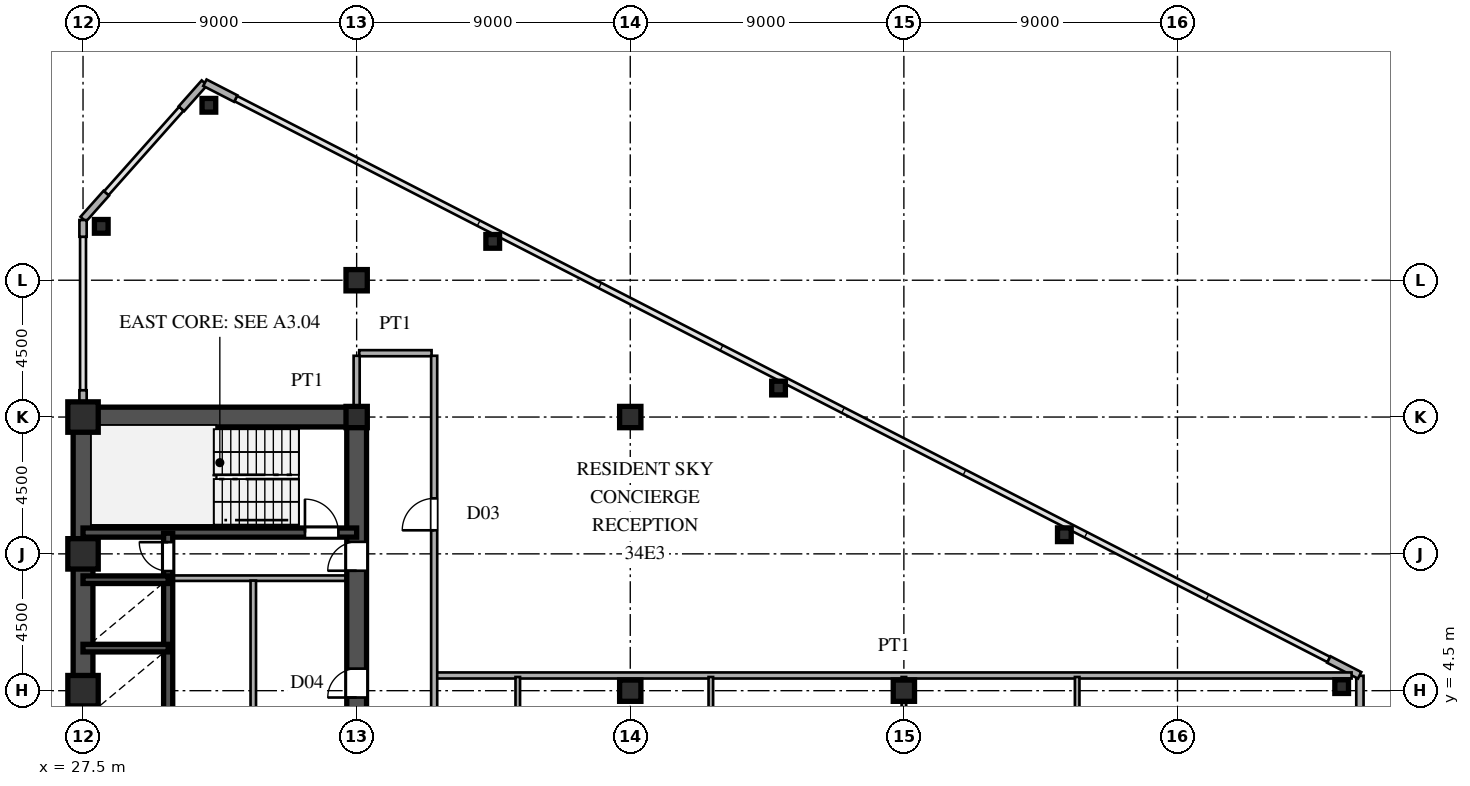
"""IFC4 building model, lengths in metres.
Left out: names, types, materials, properties, quantities, classifications, styles, units other than length and angle.
Written with IfcOpenShell. Run it as: python <this file> out.ifc"""

import sys

from ifc_helpers import new_model, si_unit, direction, frame, frame_2d, origin, origin_2d, place, context, subcontext, project, spatial, rectangle, hollow_rectangle, i_section, extrude, source, transform, mapped, element, fill, save


model = new_model("IFC4")
c1 = context("Model", 3, precision=1e-05, world=origin(), true_north=direction((0.0, 1.0)))
c2 = subcontext(c1, "Body", "Model", "MODEL_VIEW")
j1 = project(units=[si_unit("LENGTHUNIT", "METRE"), si_unit("PLANEANGLEUNIT", "RADIAN")], contexts=[c1])
p1 = place(None, origin())
s1 = spatial("IfcSite", under=j1, at=p1, CompositionType="ELEMENT")
p2 = place(p1, origin())
s2 = spatial("IfcBuilding", under=s1, at=p2, CompositionType="ELEMENT")
p3 = place(p2, frame((0.0, 0.0, 128.4)))
s3 = spatial("IfcBuildingStorey", under=s2, at=p3, CompositionType="ELEMENT", Elevation=128.4)
m1 = source(origin(), c2, "Body", "SweptSolid", [
    extrude(hollow_rectangle(XDim=1.0, YDim=1.0, WallThickness=0.042, at=origin_2d()), origin(), (0.0, 0.0, 1.0), 3.6),
])
for number, where, z_axis, x_axis in (
    (1, (27.5, 4.5, 0.0), (0.0, 0.0, 1.0), (1.0, 0.0, 0.0)),
    (2, (27.5, 9.0, 0.0), (0.0, 0.0, 1.0), (1.0, 0.0, 0.0)),
    (3, (27.5, 13.5, 0.0), (0.0, 0.0, 1.0), (1.0, 0.0, 0.0)),
):
    element("IfcColumn", number, at=place(p3, frame(where, z_axis=z_axis, x_axis=x_axis)), inside=s3, PredefinedType="COLUMN", context=c2, shape_type="MappedRepresentation", body=[
        mapped(m1, transform((0.0, 0.0, 0.0), scale=1.0)),
    ])
m2 = source(origin(), c2, "Body", "SweptSolid", [
    extrude(i_section(OverallWidth=0.7, OverallDepth=0.7, WebThickness=0.028, FlangeThickness=0.045, at=origin_2d()), origin(), (0.0, 0.0, 1.0), 3.6),
])
for number, where, z_axis, x_axis in (
    (4, (36.5, 13.5, 0.0), (0.0, 0.0, 1.0), (1.0, 0.0, 0.0)),
    (5, (36.5, 18.0, 0.0), (0.0, 0.0, 1.0), (1.0, 0.0, 0.0)),
    (6, (45.5, 4.5, 0.0), (0.0, 0.0, 1.0), (1.0, 0.0, 0.0)),
    (7, (45.5, 13.5, 0.0), (0.0, 0.0, 1.0), (1.0, 0.0, 0.0)),
    (8, (54.5, 4.5, 0.0), (0.0, 0.0, 1.0), (1.0, 0.0, 0.0)),
):
    element("IfcColumn", number, at=place(p3, frame(where, z_axis=z_axis, x_axis=x_axis)), inside=s3, PredefinedType="COLUMN", context=c2, shape_type="MappedRepresentation", body=[
        mapped(m2, transform((0.0, 0.0, 0.0), scale=1.0)),
    ])
m3 = source(origin(), c2, "Body", "SweptSolid", [
    extrude(hollow_rectangle(XDim=0.45, YDim=0.45, WallThickness=0.018, at=origin_2d()), origin(), (0.0, 0.0, 1.0), 3.6),
])
for number, where, z_axis, x_axis in (
    (9, (68.9, 4.634, 0.0), (0.0, 0.0, 1.0), (1.0, 0.0, 0.0)),
    (10, (31.64, 23.754, 0.0), (0.0, 0.0, 1.0), (1.0, 0.0, 0.0)),
    (11, (28.1, 19.772, 0.0), (0.0, 0.0, 1.0), (1.0, 0.0, 0.0)),
    (12, (40.976, 19.278, 0.0), (0.0, 0.0, 1.0), (1.0, 0.0, 0.0)),
    (13, (50.377, 14.453, 0.0), (0.0, 0.0, 1.0), (1.0, 0.0, 0.0)),
    (14, (59.779, 9.629, 0.0), (0.0, 0.0, 1.0), (1.0, 0.0, 0.0)),
):
    element("IfcColumn", number, at=place(p3, frame(where, z_axis=z_axis, x_axis=x_axis)), inside=s3, PredefinedType="COLUMN", context=c2, shape_type="MappedRepresentation", body=[
        mapped(m3, transform((0.0, 0.0, 0.0), scale=1.0)),
    ])
p4 = place(p3, frame((69.5, 3.85, 0.0), z_axis=(0.0, 0.0, 1.0), x_axis=(0.0, 1.0, 0.0)))
e15 = element("IfcWall", 15, at=p4, inside=s3, PredefinedType="SOLIDWALL", context=c2, shape_type="SweptSolid", body=[
    extrude(rectangle(XDim=1.14, YDim=0.24, at=frame_2d((0.57, 0.0))), origin(), (0.0, 0.0, 1.0), 3.38),
])
for number, where, z_axis, x_axis in (
    (16, (69.491, 5.005, 0.0), (0.0, 0.0, 1.0), (-0.89, 0.456, 0.0)),
    (17, (32.523, 23.975, 0.0), (0.0, 0.0, 1.0), (-0.89, 0.456, 0.0)),
):
    element("IfcWall", number, at=place(p3, frame(where, z_axis=z_axis, x_axis=x_axis)), inside=s3, PredefinedType="SOLIDWALL", context=c2, shape_type="SweptSolid", body=[
        extrude(rectangle(XDim=1.14, YDim=0.24, at=frame_2d((0.57, 0.0))), origin(), (0.0, 0.0, 1.0), 3.38),
    ])
for number, where, z_axis, x_axis in (
    (18, (31.493, 24.492, 0.0), (0.0, 0.0, 1.0), (-0.664, -0.747, 0.0)),
    (19, (28.264, 20.86, 0.0), (0.0, 0.0, 1.0), (-0.664, -0.747, 0.0)),
):
    element("IfcWall", number, at=place(p3, frame(where, z_axis=z_axis, x_axis=x_axis)), inside=s3, PredefinedType="SOLIDWALL", context=c2, shape_type="SweptSolid", body=[
        extrude(rectangle(XDim=1.14, YDim=0.24, at=frame_2d((0.57, 0.0))), origin(), (0.0, 0.0, 1.0), 3.38),
    ])
p5 = place(p3, frame((27.5, 13.83, 0.0), z_axis=(0.0, 0.0, 1.0), x_axis=(0.0, 1.0, 0.0)))
e20 = element("IfcWall", 20, at=p5, inside=s3, PredefinedType="SOLIDWALL", context=c2, shape_type="SweptSolid", body=[
    extrude(rectangle(XDim=0.55, YDim=0.24, at=frame_2d((0.275, 0.0))), origin(), (0.0, 0.0, 1.0), 2.88),
])
p6 = place(p3, frame((27.5, 19.43, 0.0), z_axis=(0.0, 0.0, 1.0), x_axis=(0.0, 1.0, 0.0)))
e21 = element("IfcWall", 21, at=p6, inside=s3, PredefinedType="SOLIDWALL", context=c2, shape_type="SweptSolid", body=[
    extrude(rectangle(XDim=0.55, YDim=0.24, at=frame_2d((0.275, 0.0))), origin(), (0.0, 0.0, 1.0), 3.38),
])
p7 = place(p3, frame((27.5, 1.3, 0.0), z_axis=(0.0, 0.0, 1.0), x_axis=(0.0, 1.0, 0.0)))
e22 = element("IfcWall", 22, at=p7, inside=s3, PredefinedType="SHEAR", context=c2, shape_type="SweptSolid", body=[
    extrude(rectangle(XDim=12.2, YDim=0.65, at=frame_2d((6.1, 0.0))), origin(), (0.0, 0.0, 1.0), 3.38),
])
p8 = place(p3, frame((27.5, 13.5, 0.0), z_axis=(0.0, 0.0, 1.0), x_axis=(1.0, 0.0, 0.0)))
e23 = element("IfcWall", 23, at=p8, inside=s3, PredefinedType="SHEAR", context=c2, shape_type="SweptSolid", body=[
    extrude(rectangle(XDim=9.0, YDim=0.65, at=frame_2d((4.5, 0.0))), origin(), (0.0, 0.0, 1.0), 3.38),
])
p9 = place(p3, frame((36.5, 8.2, 0.0), z_axis=(0.0, 0.0, 1.0), x_axis=(0.0, 1.0, 0.0)))
e24 = element("IfcWall", 24, at=p9, inside=s3, PredefinedType="SHEAR", context=c2, shape_type="SweptSolid", body=[
    extrude(rectangle(XDim=5.45, YDim=0.65, at=frame_2d((2.725, 0.0))), origin(), (0.0, 0.0, 1.0), 3.38),
])
p10 = place(p9, frame((0.245, 0.0, 0.0)))
e25 = element("IfcOpeningElement", 25, at=p10, cuts=e24, PredefinedType="OPENING", context=c2, shape_type="SweptSolid", body=[
    extrude(rectangle(XDim=0.95, YDim=2.15, at=frame_2d((0.475, 1.075))), frame((0.0, 0.335, 0.0), z_axis=(0.0, -1.0, 0.0), x_axis=(1.0, 0.0, 0.0)), (0.0, 0.0, 1.0), 0.67),
])
p11 = place(p3, frame((36.5, 1.3, 0.0), z_axis=(0.0, 0.0, 1.0), x_axis=(0.0, 1.0, 0.0)))
e26 = element("IfcWall", 26, at=p11, inside=s3, PredefinedType="SHEAR", context=c2, shape_type="SweptSolid", body=[
    extrude(rectangle(XDim=6.9, YDim=0.65, at=frame_2d((3.45, 0.0))), origin(), (0.0, 0.0, 1.0), 3.38),
])
p12 = place(p11, frame((2.975, 0.0, 0.0)))
e27 = element("IfcOpeningElement", 27, at=p12, cuts=e26, PredefinedType="OPENING", context=c2, shape_type="SweptSolid", body=[
    extrude(rectangle(XDim=0.95, YDim=2.15, at=frame_2d((0.475, 1.075))), frame((0.0, 0.335, 0.0), z_axis=(0.0, -1.0, 0.0), x_axis=(1.0, 0.0, 0.0)), (0.0, 0.0, 1.0), 0.67),
])
p13 = place(p3, frame((27.5, 9.7, 0.0), z_axis=(0.0, 0.0, 1.0), x_axis=(1.0, 0.0, 0.0)))
e28 = element("IfcWall", 28, at=p13, inside=s3, PredefinedType="SHEAR", context=c2, shape_type="SweptSolid", body=[
    extrude(rectangle(XDim=9.0, YDim=0.3, at=frame_2d((4.5, 0.0))), origin(), (0.0, 0.0, 1.0), 3.38),
])
p14 = place(p13, frame((7.3, 0.0, 0.0)))
e29 = element("IfcOpeningElement", 29, at=p14, cuts=e28, PredefinedType="OPENING", context=c2, shape_type="SweptSolid", body=[
    extrude(rectangle(XDim=1.1, YDim=2.2, at=frame_2d((0.55, 1.1))), frame((0.0, 0.16, 0.0), z_axis=(0.0, -1.0, 0.0), x_axis=(1.0, 0.0, 0.0)), (0.0, 0.0, 1.0), 0.32),
])
for number, where, z_axis, x_axis in (
    (30, (27.5, 5.9, 0.0), (0.0, 0.0, 1.0), (1.0, 0.0, 0.0)),
    (31, (27.5, 8.15, 0.0), (0.0, 0.0, 1.0), (1.0, 0.0, 0.0)),
):
    element("IfcWall", number, at=place(p3, frame(where, z_axis=z_axis, x_axis=x_axis)), inside=s3, PredefinedType="SHEAR", context=c2, shape_type="SweptSolid", body=[
        extrude(rectangle(XDim=2.8, YDim=0.25, at=frame_2d((1.4, 0.0))), origin(), (0.0, 0.0, 1.0), 3.38),
    ])
p15 = place(p3, frame((30.3, 3.6, 0.0), z_axis=(0.0, 0.0, 1.0), x_axis=(0.0, 1.0, 0.0)))
e32 = element("IfcWall", 32, at=p15, inside=s3, PredefinedType="SHEAR", context=c2, shape_type="SweptSolid", body=[
    extrude(rectangle(XDim=2.3, YDim=0.3, at=frame_2d((1.15, 0.0))), origin(), (0.0, 0.0, 1.0), 3.38),
])
p16 = place(p3, frame((30.3, 5.9, 0.0), z_axis=(0.0, 0.0, 1.0), x_axis=(0.0, 1.0, 0.0)))
e33 = element("IfcWall", 33, at=p16, inside=s3, PredefinedType="SHEAR", context=c2, shape_type="SweptSolid", body=[
    extrude(rectangle(XDim=2.25, YDim=0.3, at=frame_2d((1.125, 0.0))), origin(), (0.0, 0.0, 1.0), 3.38),
])
p17 = place(p3, frame((30.3, 8.15, 0.0), z_axis=(0.0, 0.0, 1.0), x_axis=(0.0, 1.0, 0.0)))
e34 = element("IfcWall", 34, at=p17, inside=s3, PredefinedType="SHEAR", context=c2, shape_type="SweptSolid", body=[
    extrude(rectangle(XDim=1.53, YDim=0.3, at=frame_2d((0.765, 0.0))), origin(), (0.0, 0.0, 1.0), 3.38),
])
p18 = place(p17, frame((0.285, 0.0, 0.0)))
e35 = element("IfcOpeningElement", 35, at=p18, cuts=e34, PredefinedType="OPENING", context=c2, shape_type="SweptSolid", body=[
    extrude(rectangle(XDim=0.95, YDim=2.15, at=frame_2d((0.475, 1.075))), frame((0.0, 0.16, 0.0), z_axis=(0.0, -1.0, 0.0), x_axis=(1.0, 0.0, 0.0)), (0.0, 0.0, 1.0), 0.32),
])
p19 = place(p3, frame((30.45, 8.2, 0.0), z_axis=(0.0, 0.0, 1.0), x_axis=(1.0, 0.0, 0.0)))
e36 = element("IfcWall", 36, at=p19, inside=s3, PredefinedType="PARTITIONING", context=c2, shape_type="SweptSolid", body=[
    extrude(rectangle(XDim=5.7, YDim=0.18, at=frame_2d((2.85, 0.0))), origin(), (0.0, 0.0, 1.0), 3.38),
])
p20 = place(p3, frame((33.1, 1.38, 0.0), z_axis=(0.0, 0.0, 1.0), x_axis=(0.0, 1.0, 0.0)))
e37 = element("IfcWall", 37, at=p20, inside=s3, PredefinedType="PARTITIONING", context=c2, shape_type="SweptSolid", body=[
    extrude(rectangle(XDim=6.74, YDim=0.18, at=frame_2d((3.37, 0.0))), origin(), (0.0, 0.0, 1.0), 3.38),
])
p21 = place(p3, frame((39.13, 5.0, 0.0), z_axis=(0.0, 0.0, 1.0), x_axis=(1.0, 0.0, 0.0)))
e38 = element("IfcWall", 38, at=p21, inside=s3, PredefinedType="PARTITIONING", context=c2, shape_type="SweptSolid", body=[
    extrude(rectangle(XDim=30.096, YDim=0.2, at=frame_2d((15.048, 0.0))), origin(), (0.0, 0.0, 1.0), 3.38),
])
p22 = place(p3, frame((36.585, 15.6, 0.0), z_axis=(0.0, 0.0, 1.0), x_axis=(1.0, 0.0, 0.0)))
e39 = element("IfcWall", 39, at=p22, inside=s3, PredefinedType="PARTITIONING", context=c2, shape_type="SweptSolid", body=[
    extrude(rectangle(XDim=2.38, YDim=0.2, at=frame_2d((1.19, 0.0))), origin(), (0.0, 0.0, 1.0), 3.38),
])
p23 = place(p3, frame((36.5, 13.83, 0.0), z_axis=(0.0, 0.0, 1.0), x_axis=(0.0, 1.0, 0.0)))
e40 = element("IfcWall", 40, at=p23, inside=s3, PredefinedType="PARTITIONING", context=c2, shape_type="SweptSolid", body=[
    extrude(rectangle(XDim=1.685, YDim=0.2, at=frame_2d((0.842, 0.0))), origin(), (0.0, 0.0, 1.0), 2.78),
])
p24 = place(p3, frame((39.05, -15.515, 0.0), z_axis=(0.0, 0.0, 1.0), x_axis=(0.0, 1.0, 0.0)))
e41 = element("IfcWall", 41, at=p24, inside=s3, PredefinedType="PARTITIONING", context=c2, shape_type="SweptSolid", body=[
    extrude(rectangle(XDim=31.03, YDim=0.2, at=frame_2d((15.515, 0.0))), origin(), (0.0, 0.0, 1.0), 3.38),
])
p25 = place(p24, frame((1.845, 0.0, 0.0)))
e42 = element("IfcOpeningElement", 42, at=p25, cuts=e41, PredefinedType="OPENING", context=c2, shape_type="SweptSolid", body=[
    extrude(rectangle(XDim=1.05, YDim=2.25, at=frame_2d((0.525, 1.125))), frame((0.0, 0.11, 0.0), z_axis=(0.0, -1.0, 0.0), x_axis=(1.0, 0.0, 0.0)), (0.0, 0.0, 1.0), 0.22),
])
p26 = place(p24, frame((12.78, 0.0, 0.0)))
e43 = element("IfcOpeningElement", 43, at=p26, cuts=e41, PredefinedType="OPENING", context=c2, shape_type="SweptSolid", body=[
    extrude(rectangle(XDim=1.05, YDim=2.25, at=frame_2d((0.525, 1.125))), frame((0.0, 0.11, 0.0), z_axis=(0.0, -1.0, 0.0), x_axis=(1.0, 0.0, 0.0)), (0.0, 0.0, 1.0), 0.22),
])
p27 = place(p24, frame((25.29, 0.0, 0.0)))
e44 = element("IfcOpeningElement", 44, at=p27, cuts=e41, PredefinedType="OPENING", context=c2, shape_type="SweptSolid", body=[
    extrude(rectangle(XDim=1.05, YDim=2.25, at=frame_2d((0.525, 1.125))), frame((0.0, 0.11, 0.0), z_axis=(0.0, -1.0, 0.0), x_axis=(1.0, 0.0, 0.0)), (0.0, 0.0, 1.0), 0.22),
])
p28 = place(p3, frame((41.8, 0.852, 0.0), z_axis=(0.0, 0.0, 1.0), x_axis=(0.0, 1.0, 0.0)))
e45 = element("IfcWall", 45, at=p28, inside=s3, PredefinedType="PARTITIONING", context=c2, shape_type="SweptSolid", body=[
    extrude(rectangle(XDim=4.098, YDim=0.15, at=frame_2d((2.049, 0.0))), origin(), (0.0, 0.0, 1.0), 3.38),
])
p29 = place(p3, frame((48.15, -8.95, 0.0), z_axis=(0.0, 0.0, 1.0), x_axis=(0.0, 1.0, 0.0)))
e46 = element("IfcWall", 46, at=p29, inside=s3, PredefinedType="PARTITIONING", context=c2, shape_type="SweptSolid", body=[
    extrude(rectangle(XDim=13.9, YDim=0.15, at=frame_2d((6.95, 0.0))), origin(), (0.0, 0.0, 1.0), 3.38),
])
p30 = place(p29, frame((6.475, 0.0, 0.0)))
e47 = element("IfcOpeningElement", 47, at=p30, cuts=e46, PredefinedType="OPENING", context=c2, shape_type="SweptSolid", body=[
    extrude(rectangle(XDim=0.95, YDim=2.15, at=frame_2d((0.475, 1.075))), frame((0.0, 0.085, 0.0), z_axis=(0.0, -1.0, 0.0), x_axis=(1.0, 0.0, 0.0)), (0.0, 0.0, 1.0), 0.17),
])
p31 = place(p29, frame((1.808, 0.0, 0.0)))
e48 = element("IfcOpeningElement", 48, at=p31, cuts=e46, PredefinedType="OPENING", context=c2, shape_type="SweptSolid", body=[
    extrude(rectangle(XDim=0.95, YDim=2.15, at=frame_2d((0.475, 1.075))), frame((0.0, 0.085, 0.0), z_axis=(0.0, -1.0, 0.0), x_axis=(1.0, 0.0, 0.0)), (0.0, 0.0, 1.0), 0.17),
])
p32 = place(p3, frame((54.5, -12.355, 0.0), z_axis=(0.0, 0.0, 1.0), x_axis=(0.0, 1.0, 0.0)))
e49 = element("IfcWall", 49, at=p32, inside=s3, PredefinedType="PARTITIONING", context=c2, shape_type="SweptSolid", body=[
    extrude(rectangle(XDim=17.305, YDim=0.15, at=frame_2d((8.652, 0.0))), origin(), (0.0, 0.0, 1.0), 2.78),
])
p33 = place(p32, frame((1.177, 0.0, 0.0)))
e50 = element("IfcOpeningElement", 50, at=p33, cuts=e49, PredefinedType="OPENING", context=c2, shape_type="SweptSolid", body=[
    extrude(rectangle(XDim=0.95, YDim=2.15, at=frame_2d((0.475, 1.075))), frame((0.0, 0.085, 0.0), z_axis=(0.0, -1.0, 0.0), x_axis=(1.0, 0.0, 0.0)), (0.0, 0.0, 1.0), 0.17),
])
p34 = place(p32, frame((9.88, 0.0, 0.0)))
e51 = element("IfcOpeningElement", 51, at=p34, cuts=e49, PredefinedType="OPENING", context=c2, shape_type="SweptSolid", body=[
    extrude(rectangle(XDim=0.95, YDim=2.15, at=frame_2d((0.475, 1.075))), frame((0.0, 0.085, 0.0), z_axis=(0.0, -1.0, 0.0), x_axis=(1.0, 0.0, 0.0)), (0.0, 0.0, 1.0), 0.17),
])
p35 = place(p32, frame((14.547, 0.0, 0.0)))
e52 = element("IfcOpeningElement", 52, at=p35, cuts=e49, PredefinedType="OPENING", context=c2, shape_type="SweptSolid", body=[
    extrude(rectangle(XDim=0.95, YDim=2.15, at=frame_2d((0.475, 1.075))), frame((0.0, 0.085, 0.0), z_axis=(0.0, -1.0, 0.0), x_axis=(1.0, 0.0, 0.0)), (0.0, 0.0, 1.0), 0.17),
])
p36 = place(p3, frame((60.2, -4.283, 0.0), z_axis=(0.0, 0.0, 1.0), x_axis=(0.0, 1.0, 0.0)))
e53 = element("IfcWall", 53, at=p36, inside=s3, PredefinedType="PARTITIONING", context=c2, shape_type="SweptSolid", body=[
    extrude(rectangle(XDim=9.233, YDim=0.15, at=frame_2d((4.616, 0.0))), origin(), (0.0, 0.0, 1.0), 3.38),
])
p37 = place(p36, frame((1.808, 0.0, 0.0)))
e54 = element("IfcOpeningElement", 54, at=p37, cuts=e53, PredefinedType="OPENING", context=c2, shape_type="SweptSolid", body=[
    extrude(rectangle(XDim=0.95, YDim=2.15, at=frame_2d((0.475, 1.075))), frame((0.0, 0.085, 0.0), z_axis=(0.0, -1.0, 0.0), x_axis=(1.0, 0.0, 0.0)), (0.0, 0.0, 1.0), 0.17),
])
p38 = place(p36, frame((6.475, 0.0, 0.0)))
e55 = element("IfcOpeningElement", 55, at=p38, cuts=e53, PredefinedType="OPENING", context=c2, shape_type="SweptSolid", body=[
    extrude(rectangle(XDim=0.95, YDim=2.15, at=frame_2d((0.475, 1.075))), frame((0.0, 0.085, 0.0), z_axis=(0.0, -1.0, 0.0), x_axis=(1.0, 0.0, 0.0)), (0.0, 0.0, 1.0), 0.17),
])
m4 = source(origin(), c2, "Body", "SweptSolid", [
    extrude(rectangle(XDim=0.95, YDim=2.15, at=frame_2d((0.475, 1.075))), frame((0.0, 0.025, 0.0), z_axis=(0.0, -1.0, 0.0), x_axis=(1.0, 0.0, 0.0)), (0.0, 0.0, 1.0), 0.05),
])
p39 = place(p10, origin())
e56 = element("IfcDoor", 56, at=p39, inside=s3, OperationType="SINGLE_SWING_LEFT", PredefinedType="DOOR", context=c2, shape_type="MappedRepresentation", body=[
    mapped(m4, transform((0.0, 0.0, 0.0), scale=1.0)),
])
fill(e25, e56)
p40 = place(p12, origin())
e57 = element("IfcDoor", 57, at=p40, inside=s3, OperationType="SINGLE_SWING_LEFT", PredefinedType="DOOR", context=c2, shape_type="MappedRepresentation", body=[
    mapped(m4, transform((0.0, 0.0, 0.0), scale=1.0)),
])
fill(e27, e57)
m5 = source(origin(), c2, "Body", "SweptSolid", [
    extrude(rectangle(XDim=1.1, YDim=2.2, at=frame_2d((0.55, 1.1))), frame((0.0, 0.025, 0.0), z_axis=(0.0, -1.0, 0.0), x_axis=(1.0, 0.0, 0.0)), (0.0, 0.0, 1.0), 0.05),
])
p41 = place(p14, origin())
e58 = element("IfcDoor", 58, at=p41, inside=s3, OperationType="SINGLE_SWING_LEFT", PredefinedType="DOOR", context=c2, shape_type="MappedRepresentation", body=[
    mapped(m5, transform((0.0, 0.0, 0.0), scale=1.0)),
])
fill(e29, e58)
p42 = place(p18, origin())
e59 = element("IfcDoor", 59, at=p42, inside=s3, OperationType="SINGLE_SWING_RIGHT", PredefinedType="DOOR", context=c2, shape_type="MappedRepresentation", body=[
    mapped(m4, transform((0.0, 0.0, 0.0), scale=1.0)),
])
fill(e35, e59)
m6 = source(origin(), c2, "Body", "SweptSolid", [
    extrude(rectangle(XDim=1.05, YDim=2.25, at=frame_2d((0.525, 1.125))), frame((0.0, 0.025, 0.0), z_axis=(0.0, -1.0, 0.0), x_axis=(1.0, 0.0, 0.0)), (0.0, 0.0, 1.0), 0.05),
])
p43 = place(p27, origin())
e60 = element("IfcDoor", 60, at=p43, inside=s3, OperationType="SINGLE_SWING_LEFT", PredefinedType="DOOR", context=c2, shape_type="MappedRepresentation", body=[
    mapped(m6, transform((0.0, 0.0, 0.0), scale=1.0)),
])
fill(e44, e60)
save(model, sys.argv[1])
